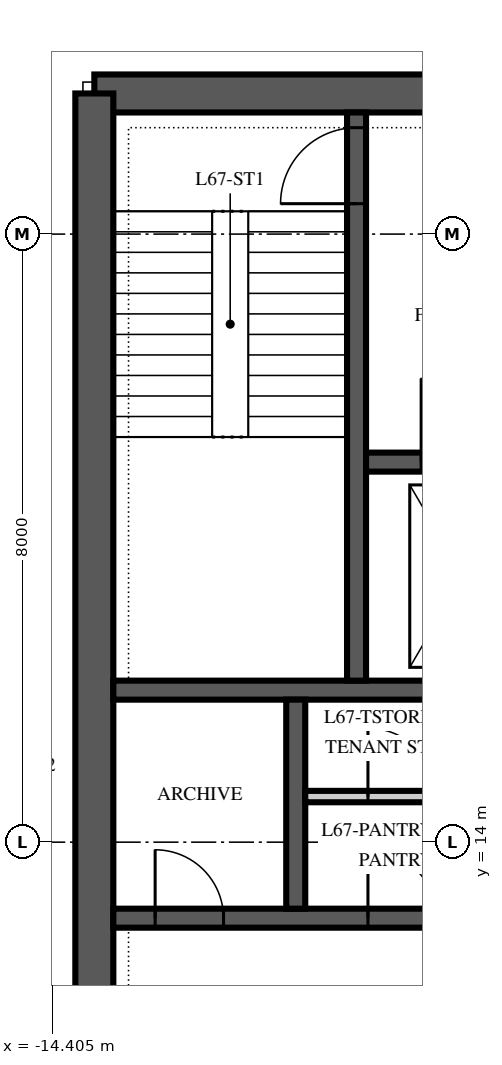
"""IFC4 building model, lengths in metres.
Left out: names, types, materials, properties, quantities, classifications, styles, units other than length and angle.
Written with IfcOpenShell. Run it as: python <this file> out.ifc"""

import sys

from ifc_helpers import new_model, si_unit, direction, frame, frame_2d, origin, place, context, subcontext, project, spatial, polyline, rectangle, outline, extrude, element, fill, save


model = new_model("IFC4")
c1 = context("Model", 3, precision=1e-05, world=origin(), true_north=direction((0.0, 1.0)))
c2 = subcontext(c1, "Body", "Model", "MODEL_VIEW")
j1 = project(units=[si_unit("LENGTHUNIT", "METRE"), si_unit("PLANEANGLEUNIT", "RADIAN")], contexts=[c1])
p1 = place(None, origin())
s1 = spatial("IfcSite", under=j1, at=p1, CompositionType="ELEMENT")
p2 = place(p1, origin())
s2 = spatial("IfcBuilding", under=s1, at=p2, CompositionType="ELEMENT")
p3 = place(p2, frame((0.0, 0.0, 288.0)))
s3 = spatial("IfcBuildingStorey", under=s2, at=p3, CompositionType="ELEMENT", Elevation=288.0)
p4 = place(p3, frame((13.85, 23.85, 0.0), z_axis=(0.0, 0.0, 1.0), x_axis=(-1.0, 0.0, 0.0)))
e1 = element("IfcWall", 1, at=p4, inside=s3, PredefinedType="SHEAR", context=c2, shape_type="SweptSolid", body=[
    extrude(rectangle(XDim=27.7, YDim=0.5, at=frame_2d((13.85, 0.0))), origin(), (0.0, 0.0, 1.0), 4.0),
])
p5 = place(p4, frame((21.75, 0.0, 0.0)))
e2 = element("IfcOpeningElement", 2, at=p5, cuts=e1, PredefinedType="OPENING", context=c2, shape_type="SweptSolid", body=[
    extrude(rectangle(XDim=1.0, YDim=2.1, at=frame_2d((0.5, 1.05))), frame((0.0, 0.265, 0.0), z_axis=(0.0, -1.0, 0.0), x_axis=(1.0, 0.0, 0.0)), (0.0, 0.0, 1.0), 0.53),
])
p6 = place(p4, frame((4.95, 0.0, 0.0)))
e3 = element("IfcOpeningElement", 3, at=p6, cuts=e1, PredefinedType="OPENING", context=c2, shape_type="SweptSolid", body=[
    extrude(rectangle(XDim=1.0, YDim=2.1, at=frame_2d((0.5, 1.05))), frame((0.0, 0.265, 0.0), z_axis=(0.0, -1.0, 0.0), x_axis=(1.0, 0.0, 0.0)), (0.0, 0.0, 1.0), 0.53),
])
p7 = place(p4, frame((17.35, 0.0, 0.0)))
e4 = element("IfcOpeningElement", 4, at=p7, cuts=e1, PredefinedType="OPENING", context=c2, shape_type="SweptSolid", body=[
    extrude(rectangle(XDim=1.0, YDim=2.1, at=frame_2d((0.5, 1.05))), frame((0.0, 0.265, 0.0), z_axis=(0.0, -1.0, 0.0), x_axis=(1.0, 0.0, 0.0)), (0.0, 0.0, 1.0), 0.53),
])
p8 = place(p4, frame((13.35, 0.0, 0.0)))
e5 = element("IfcOpeningElement", 5, at=p8, cuts=e1, PredefinedType="OPENING", context=c2, shape_type="SweptSolid", body=[
    extrude(rectangle(XDim=1.0, YDim=2.1, at=frame_2d((0.5, 1.05))), frame((0.0, 0.265, 0.0), z_axis=(0.0, -1.0, 0.0), x_axis=(1.0, 0.0, 0.0)), (0.0, 0.0, 1.0), 0.53),
])
p9 = place(p4, frame((9.35, 0.0, 0.0)))
e6 = element("IfcOpeningElement", 6, at=p9, cuts=e1, PredefinedType="OPENING", context=c2, shape_type="SweptSolid", body=[
    extrude(rectangle(XDim=1.0, YDim=2.1, at=frame_2d((0.5, 1.05))), frame((0.0, 0.265, 0.0), z_axis=(0.0, -1.0, 0.0), x_axis=(1.0, 0.0, 0.0)), (0.0, 0.0, 1.0), 0.53),
])
p10 = place(p3, frame((-13.85, 23.85, 0.0), z_axis=(0.0, 0.0, 1.0), x_axis=(0.0, -1.0, 0.0)))
e7 = element("IfcWall", 7, at=p10, inside=s3, PredefinedType="SHEAR", context=c2, shape_type="SweptSolid", body=[
    extrude(outline(polyline([(0.0, -0.25), (17.7, -0.25), (17.7, 0.0), (17.45, 0.0), (17.45, 0.25), (0.25, 0.25), (0.25, 0.0), (0.0, 0.0), (0.0, -0.25)])), origin(), (0.0, 0.0, 1.0), 4.0),
])
p11 = place(p10, frame((11.75, 0.0, 0.0)))
e8 = element("IfcOpeningElement", 8, at=p11, cuts=e7, PredefinedType="OPENING", context=c2, shape_type="SweptSolid", body=[
    extrude(rectangle(XDim=1.8, YDim=2.4, at=frame_2d((0.9, 1.2))), frame((0.0, 0.265, 0.0), z_axis=(0.0, -1.0, 0.0), x_axis=(1.0, 0.0, 0.0)), (0.0, 0.0, 1.0), 0.53),
])
p12 = place(p3, frame((-13.6, 13.0, 0.0), z_axis=(0.0, 0.0, 1.0), x_axis=(1.0, 0.0, 0.0)))
e9 = element("IfcWall", 9, at=p12, inside=s3, PredefinedType="SHEAR", context=c2, shape_type="SweptSolid", body=[
    extrude(rectangle(XDim=27.2, YDim=0.25, at=frame_2d((13.6, 0.0))), origin(), (0.0, 0.0, 1.0), 4.0),
])
p13 = place(p12, frame((15.25, 0.0, 0.0)))
e10 = element("IfcOpeningElement", 10, at=p13, cuts=e9, PredefinedType="OPENING", context=c2, shape_type="SweptSolid", body=[
    extrude(rectangle(XDim=0.9, YDim=2.1, at=frame_2d((0.45, 1.05))), frame((0.0, 0.14, 0.0), z_axis=(0.0, -1.0, 0.0), x_axis=(1.0, 0.0, 0.0)), (0.0, 0.0, 1.0), 0.28),
])
p14 = place(p12, frame((17.65, 0.0, 0.0)))
e11 = element("IfcOpeningElement", 11, at=p14, cuts=e9, PredefinedType="OPENING", context=c2, shape_type="SweptSolid", body=[
    extrude(rectangle(XDim=0.9, YDim=2.1, at=frame_2d((0.45, 1.05))), frame((0.0, 0.14, 0.0), z_axis=(0.0, -1.0, 0.0), x_axis=(1.0, 0.0, 0.0)), (0.0, 0.0, 1.0), 0.28),
])
p15 = place(p12, frame((19.95, 0.0, 0.0)))
e12 = element("IfcOpeningElement", 12, at=p15, cuts=e9, PredefinedType="OPENING", context=c2, shape_type="SweptSolid", body=[
    extrude(rectangle(XDim=0.9, YDim=2.1, at=frame_2d((0.45, 1.05))), frame((0.0, 0.14, 0.0), z_axis=(0.0, -1.0, 0.0), x_axis=(1.0, 0.0, 0.0)), (0.0, 0.0, 1.0), 0.28),
])
p16 = place(p12, frame((21.95, 0.0, 0.0)))
e13 = element("IfcOpeningElement", 13, at=p16, cuts=e9, PredefinedType="OPENING", context=c2, shape_type="SweptSolid", body=[
    extrude(rectangle(XDim=0.9, YDim=2.1, at=frame_2d((0.45, 1.05))), frame((0.0, 0.14, 0.0), z_axis=(0.0, -1.0, 0.0), x_axis=(1.0, 0.0, 0.0)), (0.0, 0.0, 1.0), 0.28),
])
p17 = place(p12, frame((0.55, 0.0, 0.0)))
e14 = element("IfcOpeningElement", 14, at=p17, cuts=e9, PredefinedType="OPENING", context=c2, shape_type="SweptSolid", body=[
    extrude(rectangle(XDim=0.9, YDim=2.1, at=frame_2d((0.45, 1.05))), frame((0.0, 0.14, 0.0), z_axis=(0.0, -1.0, 0.0), x_axis=(1.0, 0.0, 0.0)), (0.0, 0.0, 1.0), 0.28),
])
p18 = place(p12, frame((3.35, 0.0, 0.0)))
e15 = element("IfcOpeningElement", 15, at=p18, cuts=e9, PredefinedType="OPENING", context=c2, shape_type="SweptSolid", body=[
    extrude(rectangle(XDim=0.9, YDim=2.1, at=frame_2d((0.45, 1.05))), frame((0.0, 0.14, 0.0), z_axis=(0.0, -1.0, 0.0), x_axis=(1.0, 0.0, 0.0)), (0.0, 0.0, 1.0), 0.28),
])
p19 = place(p12, frame((6.15, 0.0, 0.0)))
e16 = element("IfcOpeningElement", 16, at=p19, cuts=e9, PredefinedType="OPENING", context=c2, shape_type="SweptSolid", body=[
    extrude(rectangle(XDim=0.9, YDim=2.1, at=frame_2d((0.45, 1.05))), frame((0.0, 0.14, 0.0), z_axis=(0.0, -1.0, 0.0), x_axis=(1.0, 0.0, 0.0)), (0.0, 0.0, 1.0), 0.28),
])
p20 = place(p3, frame((-13.6, 16.0, 0.0), z_axis=(0.0, 0.0, 1.0), x_axis=(1.0, 0.0, 0.0)))
e17 = element("IfcWall", 17, at=p20, inside=s3, PredefinedType="SHEAR", context=c2, shape_type="SweptSolid", body=[
    extrude(rectangle(XDim=27.2, YDim=0.25, at=frame_2d((13.6, 0.0))), origin(), (0.0, 0.0, 1.0), 4.0),
])
p21 = place(p3, frame((-11.2, 13.125, 0.0), z_axis=(0.0, 0.0, 1.0), x_axis=(0.0, 1.0, 0.0)))
e18 = element("IfcWall", 18, at=p21, inside=s3, PredefinedType="SHEAR", context=c2, shape_type="SweptSolid", body=[
    extrude(rectangle(XDim=2.75, YDim=0.25, at=frame_2d((1.375, 0.0))), origin(), (0.0, 0.0, 1.0), 4.0),
])
p22 = place(p3, frame((-10.4, 16.125, 0.0), z_axis=(0.0, 0.0, 1.0), x_axis=(0.0, 1.0, 0.0)))
e19 = element("IfcWall", 19, at=p22, inside=s3, PredefinedType="SHEAR", context=c2, shape_type="SweptSolid", body=[
    extrude(rectangle(XDim=7.475, YDim=0.25, at=frame_2d((3.738, 0.0))), origin(), (0.0, 0.0, 1.0), 4.0),
])
p23 = place(p22, frame((6.275, 0.0, 0.0)))
e20 = element("IfcOpeningElement", 20, at=p23, cuts=e19, PredefinedType="OPENING", context=c2, shape_type="SweptSolid", body=[
    extrude(rectangle(XDim=1.0, YDim=2.1, at=frame_2d((0.5, 1.05))), frame((0.0, 0.14, 0.0), z_axis=(0.0, -1.0, 0.0), x_axis=(1.0, 0.0, 0.0)), (0.0, 0.0, 1.0), 0.28),
])
p24 = place(p3, frame((-10.275, 19.0, 0.0), z_axis=(0.0, 0.0, 1.0), x_axis=(1.0, 0.0, 0.0)))
e21 = element("IfcWall", 21, at=p24, inside=s3, PredefinedType="SHEAR", context=c2, shape_type="SweptSolid", body=[
    extrude(rectangle(XDim=3.75, YDim=0.25, at=frame_2d((1.875, 0.0))), origin(), (0.0, 0.0, 1.0), 4.0),
])
p25 = place(p24, frame((0.725, 0.0, 0.0)))
e22 = element("IfcOpeningElement", 22, at=p25, cuts=e21, PredefinedType="OPENING", context=c2, shape_type="SweptSolid", body=[
    extrude(rectangle(XDim=1.1, YDim=2.1, at=frame_2d((0.55, 1.05))), frame((0.0, 0.14, 0.0), z_axis=(0.0, -1.0, 0.0), x_axis=(1.0, 0.0, 0.0)), (0.0, 0.0, 1.0), 0.28),
])
p26 = place(p3, frame((-11.075, 14.6, 0.0), z_axis=(0.0, 0.0, 1.0), x_axis=(1.0, 0.0, 0.0)))
e23 = element("IfcWall", 23, at=p26, inside=s3, PredefinedType="PARTITIONING", context=c2, shape_type="SweptSolid", body=[
    extrude(rectangle(XDim=2.55, YDim=0.15, at=frame_2d((1.275, 0.0))), origin(), (0.0, 0.0, 1.0), 3.85),
])
p27 = place(p26, frame((0.825, 0.0, 0.0)))
e24 = element("IfcOpeningElement", 24, at=p27, cuts=e23, PredefinedType="OPENING", context=c2, shape_type="SweptSolid", body=[
    extrude(rectangle(XDim=0.9, YDim=2.1, at=frame_2d((0.45, 1.05))), frame((0.0, 0.09, 0.0), z_axis=(0.0, -1.0, 0.0), x_axis=(1.0, 0.0, 0.0)), (0.0, 0.0, 1.0), 0.18),
])
p28 = place(p23, origin())
e25 = element("IfcDoor", 25, at=p28, inside=s3, OperationType="SINGLE_SWING_LEFT", PredefinedType="DOOR", context=c2, shape_type="SweptSolid", body=[
    extrude(rectangle(XDim=1.0, YDim=2.1, at=frame_2d((0.5, 1.05))), frame((0.0, 0.125, 0.0), z_axis=(0.0, -1.0, 0.0), x_axis=(1.0, 0.0, 0.0)), (0.0, 0.0, 1.0), 0.25),
])
fill(e20, e25)
p29 = place(p25, origin())
e26 = element("IfcDoor", 26, at=p29, inside=s3, OperationType="SLIDING_TO_RIGHT", PredefinedType="DOOR", context=c2, shape_type="SweptSolid", body=[
    extrude(rectangle(XDim=1.1, YDim=2.1, at=frame_2d((0.55, 1.05))), frame((0.0, 0.125, 0.0), z_axis=(0.0, -1.0, 0.0), x_axis=(1.0, 0.0, 0.0)), (0.0, 0.0, 1.0), 0.25),
])
fill(e22, e26)
p30 = place(p17, origin())
e27 = element("IfcDoor", 27, at=p30, inside=s3, OperationType="SINGLE_SWING_LEFT", PredefinedType="DOOR", context=c2, shape_type="SweptSolid", body=[
    extrude(rectangle(XDim=0.9, YDim=2.1, at=frame_2d((0.45, 1.05))), frame((0.0, 0.125, 0.0), z_axis=(0.0, -1.0, 0.0), x_axis=(1.0, 0.0, 0.0)), (0.0, 0.0, 1.0), 0.25),
])
fill(e14, e27)
p31 = place(p18, origin())
e28 = element("IfcDoor", 28, at=p31, inside=s3, OperationType="SINGLE_SWING_LEFT", PredefinedType="DOOR", context=c2, shape_type="SweptSolid", body=[
    extrude(rectangle(XDim=0.9, YDim=2.1, at=frame_2d((0.45, 1.05))), frame((0.0, 0.125, 0.0), z_axis=(0.0, -1.0, 0.0), x_axis=(1.0, 0.0, 0.0)), (0.0, 0.0, 1.0), 0.25),
])
fill(e15, e28)
p32 = place(p27, origin())
e29 = element("IfcDoor", 29, at=p32, inside=s3, OperationType="SINGLE_SWING_LEFT", PredefinedType="DOOR", context=c2, shape_type="SweptSolid", body=[
    extrude(rectangle(XDim=0.9, YDim=2.1, at=frame_2d((0.45, 1.05))), frame((0.0, 0.075, 0.0), z_axis=(0.0, -1.0, 0.0), x_axis=(1.0, 0.0, 0.0)), (0.0, 0.0, 1.0), 0.149),
])
fill(e24, e29)
save(model, sys.argv[1])
